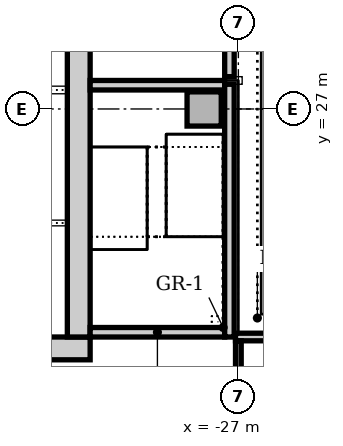
"""IFC4 building model, lengths in metres.
Left out: names, types, materials, properties, quantities, classifications, styles, units other than length and angle.
Written with IfcOpenShell. Run it as: python <this file> out.ifc"""

import sys

from ifc_helpers import new_model, si_unit, direction, frame, frame_2d, origin, origin_2d, place, context, subcontext, project, spatial, rectangle, extrude, element, fill, save


model = new_model("IFC4")
c1 = context("Model", 3, precision=1e-05, world=origin(), true_north=direction((0.0, 1.0)))
c2 = subcontext(c1, "Body", "Model", "MODEL_VIEW")
j1 = project(units=[si_unit("LENGTHUNIT", "METRE"), si_unit("PLANEANGLEUNIT", "RADIAN")], contexts=[c1])
p1 = place(None, origin())
s1 = spatial("IfcSite", under=j1, at=p1, CompositionType="ELEMENT")
p2 = place(p1, origin())
s2 = spatial("IfcBuilding", under=s1, at=p2, CompositionType="ELEMENT")
p3 = place(p2, frame((0.0, 0.0, 21.0)))
s3 = spatial("IfcBuildingStorey", under=s2, at=p3, CompositionType="ELEMENT", Elevation=21.0)
p4 = place(p3, frame((-42.6, 20.7, 0.0), z_axis=(0.0, 0.0, 1.0), x_axis=(1.0, 0.0, 0.0)))
e1 = element("IfcWall", 1, at=p4, inside=s3, PredefinedType="SOLIDWALL", context=c2, shape_type="SweptSolid", body=[
    extrude(rectangle(XDim=11.7, YDim=0.6, at=frame_2d((5.85, 0.0))), origin(), (0.0, 0.0, 1.0), 5.0),
])
p5 = place(p3, frame((-31.2, 21.0, 0.0), z_axis=(0.0, 0.0, 1.0), x_axis=(0.0, 1.0, 0.0)))
e2 = element("IfcWall", 2, at=p5, inside=s3, PredefinedType="SOLIDWALL", context=c2, shape_type="SweptSolid", body=[
    extrude(rectangle(XDim=9.5, YDim=0.6, at=frame_2d((4.75, 0.0))), origin(), (0.0, 0.0, 1.0), 5.0),
])
p6 = place(p5, frame((5.25, 0.0, 0.0)))
e3 = element("IfcOpeningElement", 3, at=p6, cuts=e2, PredefinedType="OPENING", context=c2, shape_type="SweptSolid", body=[
    extrude(rectangle(XDim=1.0, YDim=2.1, at=frame_2d((0.5, 1.05))), frame((0.0, 0.31, 0.0), z_axis=(0.0, -1.0, 0.0), x_axis=(1.0, 0.0, 0.0)), (0.0, 0.0, 1.0), 0.62),
])
p7 = place(p3, frame((-30.9, 21.125, 0.0), z_axis=(0.0, 0.0, 1.0), x_axis=(1.0, 0.0, 0.0)))
e4 = element("IfcWall", 4, at=p7, inside=s3, PredefinedType="SOLIDWALL", context=c2, shape_type="SweptSolid", body=[
    extrude(rectangle(XDim=3.54, YDim=0.25, at=frame_2d((1.77, 0.0))), origin(), (0.0, 0.0, 1.0), 5.0),
])
p8 = place(p3, frame((-27.36, 27.625, 0.0), z_axis=(0.0, 0.0, 1.0), x_axis=(-1.0, 0.0, 0.0)))
e5 = element("IfcWall", 5, at=p8, inside=s3, PredefinedType="SOLIDWALL", context=c2, shape_type="SweptSolid", body=[
    extrude(rectangle(XDim=3.54, YDim=0.25, at=frame_2d((1.77, 0.0))), origin(), (0.0, 0.0, 1.0), 5.0),
])
p9 = place(p8, frame((1.69, 0.0, 0.0)))
e6 = element("IfcOpeningElement", 6, at=p9, cuts=e5, PredefinedType="OPENING", context=c2, shape_type="SweptSolid", body=[
    extrude(rectangle(XDim=1.1, YDim=2.1, at=frame_2d((0.55, 1.05))), frame((0.0, 0.135, 0.0), z_axis=(0.0, -1.0, 0.0), x_axis=(1.0, 0.0, 0.0)), (0.0, 0.0, 1.0), 0.27),
])
p10 = place(p3, frame((-27.235, 21.0, 0.0), z_axis=(0.0, 0.0, 1.0), x_axis=(0.0, 1.0, 0.0)))
e7 = element("IfcWall", 7, at=p10, inside=s3, PredefinedType="SOLIDWALL", context=c2, shape_type="SweptSolid", body=[
    extrude(rectangle(XDim=6.65, YDim=0.25, at=frame_2d((3.325, 0.0))), origin(), (0.0, 0.0, 1.0), 5.0),
])
p11 = place(p3, frame((-27.235, 27.85, 0.0), z_axis=(0.0, 0.0, 1.0), x_axis=(0.0, 1.0, 0.0)))
e8 = element("IfcWall", 8, at=p11, inside=s3, PredefinedType="SOLIDWALL", context=c2, shape_type="SweptSolid", body=[
    extrude(rectangle(XDim=7.3, YDim=0.25, at=frame_2d((3.65, 0.0))), origin(), (0.0, 0.0, 1.0), 5.0),
])
p12 = place(p3, frame((-27.9, 27.0, 0.0), z_axis=(0.0, 0.0, 1.0), x_axis=(1.0, 0.0, 0.0)))
e9 = element("IfcColumn", 9, at=p12, inside=s3, PredefinedType="COLUMN", context=c2, shape_type="SweptSolid", body=[
    extrude(rectangle(XDim=0.9, YDim=0.9, at=origin_2d()), origin(), (0.0, 0.0, 1.0), 5.0),
])
p13 = place(p3, frame((-27.075, 21.0, 0.0), z_axis=(0.0, 0.0, 1.0), x_axis=(1.0, 0.0, 0.0)))
e10 = element("IfcWall", 10, at=p13, inside=s3, PredefinedType="PARTITIONING", context=c2, shape_type="SweptSolid", body=[
    extrude(rectangle(XDim=9.075, YDim=0.2, at=frame_2d((4.537, 0.0))), origin(), (0.0, 0.0, 1.0), 4.7),
])
p14 = place(p3, frame((-27.0, 3.7, 0.0), z_axis=(0.0, 0.0, 1.0), x_axis=(0.0, 1.0, 0.0)))
e11 = element("IfcWall", 11, at=p14, inside=s3, PredefinedType="PARTITIONING", context=c2, shape_type="SweptSolid", body=[
    extrude(rectangle(XDim=17.2, YDim=0.15, at=frame_2d((8.6, 0.0))), origin(), (0.0, 0.0, 1.0), 4.7),
])
p15 = place(p3, frame((-34.9, 27.5, 0.0), z_axis=(0.0, 0.0, 1.0), x_axis=(1.0, 0.0, 0.0)))
e12 = element("IfcWall", 12, at=p15, inside=s3, PredefinedType="SOLIDWALL", context=c2, shape_type="SweptSolid", body=[
    extrude(rectangle(XDim=3.4, YDim=0.2, at=frame_2d((1.7, 0.0))), origin(), (0.0, 0.0, 1.0), 5.0),
])
p16 = place(p15, frame((1.1, 0.0, 0.0)))
e13 = element("IfcOpeningElement", 13, at=p16, cuts=e12, PredefinedType="OPENING", context=c2, shape_type="SweptSolid", body=[
    extrude(rectangle(XDim=1.1, YDim=2.1, at=frame_2d((0.55, 1.05))), frame((0.0, 0.11, 0.0), z_axis=(0.0, -1.0, 0.0), x_axis=(1.0, 0.0, 0.0)), (0.0, 0.0, 1.0), 0.22),
])
p17 = place(p3, frame((-27.36, 27.75, 0.0), z_axis=(0.0, 0.0, 1.0), x_axis=(1.0, 0.0, 0.0)))
e14 = element("IfcWall", 14, at=p17, inside=s3, PredefinedType="SOLIDWALL", context=c2, shape_type="SweptSolid", body=[
    extrude(rectangle(XDim=0.46, YDim=0.2, at=frame_2d((0.23, 0.0))), origin(), (0.0, 0.0, 1.0), 5.0),
])
p18 = place(p3, frame((-31.5, 24.0, 0.0), z_axis=(0.0, 0.0, 1.0), x_axis=(-1.0, 0.0, 0.0)))
e15 = element("IfcWall", 15, at=p18, inside=s3, PredefinedType="SOLIDWALL", context=c2, shape_type="SweptSolid", body=[
    extrude(rectangle(XDim=3.4, YDim=0.15, at=frame_2d((1.7, 0.0))), origin(), (0.0, 0.0, 1.0), 5.0),
])
p19 = place(p6, frame((1.0, 0.0, 0.0), z_axis=(0.0, 0.0, 1.0), x_axis=(-1.0, 0.0, 0.0)))
e16 = element("IfcDoor", 16, at=p19, inside=s3, OperationType="SINGLE_SWING_LEFT", PredefinedType="DOOR", context=c2, shape_type="SweptSolid", body=[
    extrude(rectangle(XDim=1.0, YDim=2.1, at=frame_2d((0.5, 1.05))), frame((0.0, 0.025, 0.0), z_axis=(0.0, -1.0, 0.0), x_axis=(1.0, 0.0, 0.0)), (0.0, 0.0, 1.0), 0.05),
])
fill(e3, e16)
p20 = place(p9, origin())
e17 = element("IfcDoor", 17, at=p20, inside=s3, OperationType="SINGLE_SWING_RIGHT", PredefinedType="DOOR", context=c2, shape_type="SweptSolid", body=[
    extrude(rectangle(XDim=1.1, YDim=2.1, at=frame_2d((0.55, 1.05))), frame((0.0, 0.025, 0.0), z_axis=(0.0, -1.0, 0.0), x_axis=(1.0, 0.0, 0.0)), (0.0, 0.0, 1.0), 0.05),
])
fill(e6, e17)
save(model, sys.argv[1])
